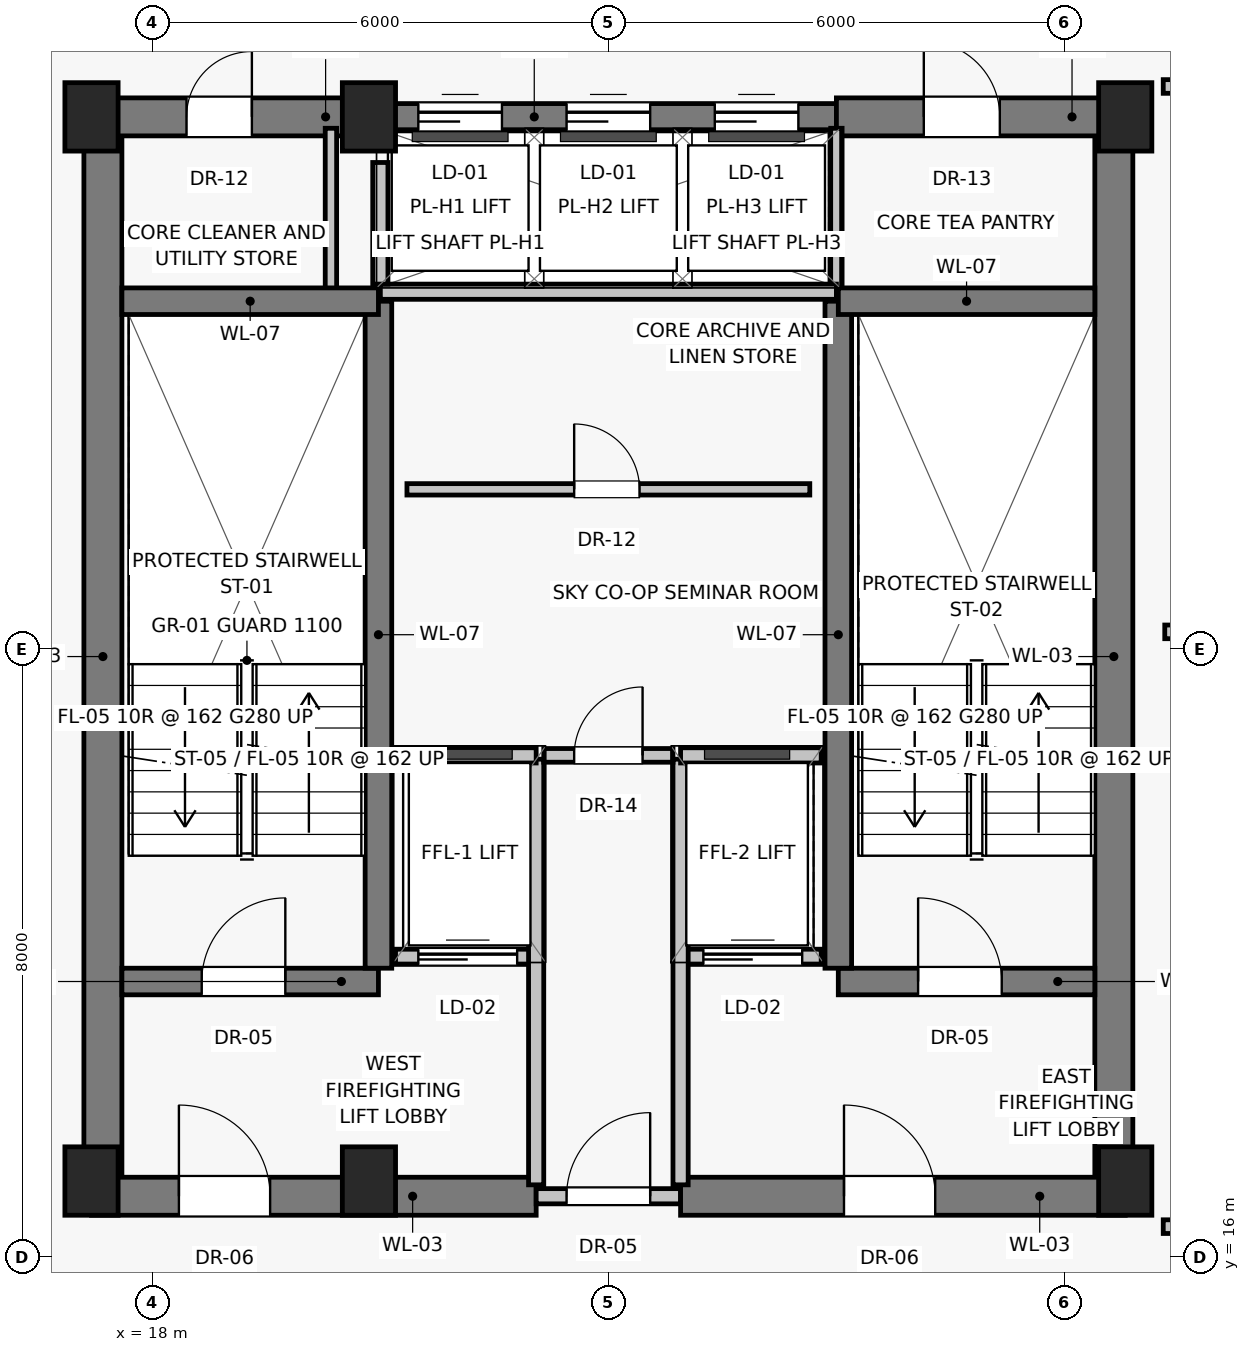
"""IFC4 building model, lengths in metres.
Left out: names, types, materials, properties, quantities, classifications, styles, units other than length and angle.
Written with IfcOpenShell. Run it as: python <this file> out.ifc"""

import sys

from ifc_helpers import new_model, si_unit, direction, frame, frame_2d, origin, origin_2d, place, context, subcontext, project, spatial, rectangle, extrude, source, transform, mapped, element, fill, save


model = new_model("IFC4")
c1 = context("Model", 3, precision=1e-05, world=origin(), true_north=direction((0.0, 1.0)))
c2 = subcontext(c1, "Body", "Model", "MODEL_VIEW")
j1 = project(units=[si_unit("LENGTHUNIT", "METRE"), si_unit("PLANEANGLEUNIT", "RADIAN")], contexts=[c1])
p1 = place(None, origin())
s1 = spatial("IfcSite", under=j1, at=p1, CompositionType="ELEMENT")
p2 = place(p1, origin())
s2 = spatial("IfcBuilding", under=s1, at=p2, CompositionType="ELEMENT")
p3 = place(p2, frame((0.0, 0.0, 204.85)))
s3 = spatial("IfcBuildingStorey", under=s2, at=p3, CompositionType="ELEMENT", Elevation=204.85)
for number, where, z_axis, x_axis in (
    (1, (17.2, 17.0, 0.0), (0.0, 0.0, 1.0), (1.0, 0.0, 0.0)),
    (2, (20.85, 17.0, 0.0), (0.0, 0.0, 1.0), (1.0, 0.0, 0.0)),
    (3, (30.8, 17.0, 0.0), (0.0, 0.0, 1.0), (1.0, 0.0, 0.0)),
    (4, (17.2, 31.0, 0.0), (0.0, 0.0, 1.0), (1.0, 0.0, 0.0)),
    (5, (20.85, 31.0, 0.0), (0.0, 0.0, 1.0), (1.0, 0.0, 0.0)),
    (6, (30.8, 31.0, 0.0), (0.0, 0.0, 1.0), (1.0, 0.0, 0.0)),
):
    element("IfcColumn", number, at=place(p3, frame(where, z_axis=z_axis, x_axis=x_axis)), inside=s3, PredefinedType="PILASTER", context=c2, shape_type="SweptSolid", body=[
        extrude(rectangle(XDim=0.7, YDim=0.9, at=origin_2d()), origin(), (0.0, 0.0, 1.0), 3.25),
    ])
for number, where, z_axis, x_axis in (
    (7, (17.35, 16.8, 0.0), (0.0, 0.0, 1.0), (0.0, 1.0, 0.0)),
    (8, (30.65, 16.8, 0.0), (0.0, 0.0, 1.0), (0.0, 1.0, 0.0)),
):
    element("IfcWall", number, at=place(p3, frame(where, z_axis=z_axis, x_axis=x_axis)), inside=s3, PredefinedType="SHEAR", context=c2, shape_type="SweptSolid", body=[
        extrude(rectangle(XDim=14.2, YDim=0.5, at=frame_2d((7.1, 0.0))), origin(), (0.0, 0.0, 1.0), 3.015),
    ])
p4 = place(p3, frame((17.2, 16.8, 0.0), z_axis=(0.0, 0.0, 1.0), x_axis=(1.0, 0.0, 0.0)))
e9 = element("IfcWall", 9, at=p4, inside=s3, PredefinedType="SHEAR", context=c2, shape_type="SweptSolid", body=[
    extrude(rectangle(XDim=5.85, YDim=0.5, at=frame_2d((2.925, 0.0))), origin(), (0.0, 0.0, 1.0), 3.015),
])
p5 = place(p4, frame((1.15, 0.0, 0.0)))
e10 = element("IfcOpeningElement", 10, at=p5, cuts=e9, PredefinedType="OPENING", context=c2, shape_type="SweptSolid", body=[
    extrude(rectangle(XDim=1.2, YDim=2.03, at=frame_2d((0.6, 1.015))), frame((0.0, 0.26, 0.0), z_axis=(0.0, -1.0, 0.0), x_axis=(1.0, 0.0, 0.0)), (0.0, 0.0, 1.0), 0.52),
])
p6 = place(p3, frame((23.05, 16.8, 0.0), z_axis=(0.0, 0.0, 1.0), x_axis=(1.0, 0.0, 0.0)))
e11 = element("IfcWall", 11, at=p6, inside=s3, PredefinedType="SOLIDWALL", context=c2, shape_type="SweptSolid", body=[
    extrude(rectangle(XDim=1.9, YDim=0.2, at=frame_2d((0.95, 0.0))), origin(), (0.0, 0.0, 1.0), 2.165),
])
p7 = place(p6, frame((0.4, 0.0, 0.0)))
e12 = element("IfcOpeningElement", 12, at=p7, cuts=e11, PredefinedType="OPENING", context=c2, shape_type="SweptSolid", body=[
    extrude(rectangle(XDim=1.1, YDim=2.03, at=frame_2d((0.55, 1.015))), frame((0.0, 0.11, 0.0), z_axis=(0.0, -1.0, 0.0), x_axis=(1.0, 0.0, 0.0)), (0.0, 0.0, 1.0), 0.22),
])
p8 = place(p3, frame((24.95, 16.8, 0.0), z_axis=(0.0, 0.0, 1.0), x_axis=(1.0, 0.0, 0.0)))
e13 = element("IfcWall", 13, at=p8, inside=s3, PredefinedType="SHEAR", context=c2, shape_type="SweptSolid", body=[
    extrude(rectangle(XDim=5.85, YDim=0.5, at=frame_2d((2.925, 0.0))), origin(), (0.0, 0.0, 1.0), 3.015),
])
p9 = place(p8, frame((2.15, 0.0, 0.0)))
e14 = element("IfcOpeningElement", 14, at=p9, cuts=e13, PredefinedType="OPENING", context=c2, shape_type="SweptSolid", body=[
    extrude(rectangle(XDim=1.2, YDim=2.03, at=frame_2d((0.6, 1.015))), frame((0.0, 0.26, 0.0), z_axis=(0.0, -1.0, 0.0), x_axis=(1.0, 0.0, 0.0)), (0.0, 0.0, 1.0), 0.52),
])
p10 = place(p3, frame((17.2, 31.0, 0.0), z_axis=(0.0, 0.0, 1.0), x_axis=(1.0, 0.0, 0.0)))
e15 = element("IfcWall", 15, at=p10, inside=s3, PredefinedType="SHEAR", context=c2, shape_type="SweptSolid", body=[
    extrude(rectangle(XDim=3.8, YDim=0.5, at=frame_2d((1.9, 0.0))), origin(), (0.0, 0.0, 1.0), 3.015),
])
p11 = place(p10, frame((1.25, 0.0, 0.0)))
e16 = element("IfcOpeningElement", 16, at=p11, cuts=e15, PredefinedType="OPENING", context=c2, shape_type="SweptSolid", body=[
    extrude(rectangle(XDim=0.86, YDim=2.01, at=frame_2d((0.43, 1.005))), frame((0.0, 0.26, 0.0), z_axis=(0.0, -1.0, 0.0), x_axis=(1.0, 0.0, 0.0)), (0.0, 0.0, 1.0), 0.52),
])
p12 = place(p3, frame((21.0, 31.0, 0.0), z_axis=(0.0, 0.0, 1.0), x_axis=(1.0, 0.0, 0.0)))
e17 = element("IfcWall", 17, at=p12, inside=s3, PredefinedType="SHEAR", context=c2, shape_type="SweptSolid", body=[
    extrude(rectangle(XDim=6.0, YDim=0.35, at=frame_2d((3.0, 0.0))), origin(), (0.0, 0.0, 1.0), 3.015),
])
p13 = place(p12, frame((0.5, 0.0, 0.0)))
e18 = element("IfcOpeningElement", 18, at=p13, cuts=e17, PredefinedType="OPENING", context=c2, shape_type="SweptSolid", body=[
    extrude(rectangle(XDim=1.1, YDim=2.08, at=frame_2d((0.55, 1.04))), frame((0.0, 0.185, 0.0), z_axis=(0.0, -1.0, 0.0), x_axis=(1.0, 0.0, 0.0)), (0.0, 0.0, 1.0), 0.37),
])
p14 = place(p12, frame((2.45, 0.0, 0.0)))
e19 = element("IfcOpeningElement", 19, at=p14, cuts=e17, PredefinedType="OPENING", context=c2, shape_type="SweptSolid", body=[
    extrude(rectangle(XDim=1.1, YDim=2.08, at=frame_2d((0.55, 1.04))), frame((0.0, 0.185, 0.0), z_axis=(0.0, -1.0, 0.0), x_axis=(1.0, 0.0, 0.0)), (0.0, 0.0, 1.0), 0.37),
])
p15 = place(p12, frame((4.4, 0.0, 0.0)))
e20 = element("IfcOpeningElement", 20, at=p15, cuts=e17, PredefinedType="OPENING", context=c2, shape_type="SweptSolid", body=[
    extrude(rectangle(XDim=1.1, YDim=2.08, at=frame_2d((0.55, 1.04))), frame((0.0, 0.185, 0.0), z_axis=(0.0, -1.0, 0.0), x_axis=(1.0, 0.0, 0.0)), (0.0, 0.0, 1.0), 0.37),
])
p16 = place(p3, frame((27.0, 31.0, 0.0), z_axis=(0.0, 0.0, 1.0), x_axis=(1.0, 0.0, 0.0)))
e21 = element("IfcWall", 21, at=p16, inside=s3, PredefinedType="SHEAR", context=c2, shape_type="SweptSolid", body=[
    extrude(rectangle(XDim=3.8, YDim=0.5, at=frame_2d((1.9, 0.0))), origin(), (0.0, 0.0, 1.0), 3.015),
])
p17 = place(p16, frame((1.15, 0.0, 0.0)))
e22 = element("IfcOpeningElement", 22, at=p17, cuts=e21, PredefinedType="OPENING", context=c2, shape_type="SweptSolid", body=[
    extrude(rectangle(XDim=1.0, YDim=2.01, at=frame_2d((0.5, 1.005))), frame((0.0, 0.26, 0.0), z_axis=(0.0, -1.0, 0.0), x_axis=(1.0, 0.0, 0.0)), (0.0, 0.0, 1.0), 0.52),
])
for number, where, z_axis, x_axis in (
    (23, (20.35, 28.65, 0.0), (0.0, 0.0, 1.0), (0.0, 1.0, 0.0)),
    (24, (27.0, 28.65, 0.0), (0.0, 0.0, 1.0), (0.0, 1.0, 0.0)),
):
    element("IfcWall", number, at=place(p3, frame(where, z_axis=z_axis, x_axis=x_axis)), inside=s3, PredefinedType="PARTITIONING", context=c2, shape_type="SweptSolid", body=[
        extrude(rectangle(XDim=2.2, YDim=0.15, at=frame_2d((1.1, 0.0))), origin(), (0.0, 0.0, 1.0), 3.015),
    ])
p18 = place(p3, frame((17.6, 19.625, 0.0), z_axis=(0.0, 0.0, 1.0), x_axis=(1.0, 0.0, 0.0)))
e25 = element("IfcWall", 25, at=p18, inside=s3, PredefinedType="SHEAR", context=c2, shape_type="SweptSolid", body=[
    extrude(rectangle(XDim=3.375, YDim=0.35, at=frame_2d((1.688, 0.0))), origin(), (0.0, 0.0, 1.0), 3.015),
])
p19 = place(p18, frame((1.05, 0.0, 0.0)))
e26 = element("IfcOpeningElement", 26, at=p19, cuts=e25, PredefinedType="OPENING", context=c2, shape_type="SweptSolid", body=[
    extrude(rectangle(XDim=1.1, YDim=2.03, at=frame_2d((0.55, 1.015))), frame((0.0, 0.185, 0.0), z_axis=(0.0, -1.0, 0.0), x_axis=(1.0, 0.0, 0.0)), (0.0, 0.0, 1.0), 0.37),
])
p20 = place(p3, frame((21.2, 19.95, 0.0), z_axis=(0.0, 0.0, 1.0), x_axis=(1.0, 0.0, 0.0)))
e27 = element("IfcWall", 27, at=p20, inside=s3, PredefinedType="SOLIDWALL", context=c2, shape_type="SweptSolid", body=[
    extrude(rectangle(XDim=1.85, YDim=0.2, at=frame_2d((0.925, 0.0))), origin(), (0.0, 0.0, 1.0), 3.015),
])
p21 = place(p20, frame((0.3, 0.0, 0.0)))
e28 = element("IfcOpeningElement", 28, at=p21, cuts=e27, PredefinedType="OPENING", context=c2, shape_type="SweptSolid", body=[
    extrude(rectangle(XDim=1.3, YDim=2.25, at=frame_2d((0.65, 1.125))), frame((0.0, 0.11, 0.0), z_axis=(0.0, -1.0, 0.0), x_axis=(1.0, 0.0, 0.0)), (0.0, 0.0, 1.0), 0.22),
])
p22 = place(p3, frame((24.95, 19.95, 0.0), z_axis=(0.0, 0.0, 1.0), x_axis=(1.0, 0.0, 0.0)))
e29 = element("IfcWall", 29, at=p22, inside=s3, PredefinedType="SOLIDWALL", context=c2, shape_type="SweptSolid", body=[
    extrude(rectangle(XDim=1.85, YDim=0.2, at=frame_2d((0.925, 0.0))), origin(), (0.0, 0.0, 1.0), 3.015),
])
p23 = place(p22, frame((0.3, 0.0, 0.0)))
e30 = element("IfcOpeningElement", 30, at=p23, cuts=e29, PredefinedType="OPENING", context=c2, shape_type="SweptSolid", body=[
    extrude(rectangle(XDim=1.3, YDim=2.25, at=frame_2d((0.65, 1.125))), frame((0.0, 0.11, 0.0), z_axis=(0.0, -1.0, 0.0), x_axis=(1.0, 0.0, 0.0)), (0.0, 0.0, 1.0), 0.22),
])
p24 = place(p3, frame((27.025, 19.625, 0.0), z_axis=(0.0, 0.0, 1.0), x_axis=(1.0, 0.0, 0.0)))
e31 = element("IfcWall", 31, at=p24, inside=s3, PredefinedType="SHEAR", context=c2, shape_type="SweptSolid", body=[
    extrude(rectangle(XDim=3.375, YDim=0.35, at=frame_2d((1.688, 0.0))), origin(), (0.0, 0.0, 1.0), 3.015),
])
p25 = place(p24, frame((1.05, 0.0, 0.0)))
e32 = element("IfcOpeningElement", 32, at=p25, cuts=e31, PredefinedType="OPENING", context=c2, shape_type="SweptSolid", body=[
    extrude(rectangle(XDim=1.1, YDim=2.03, at=frame_2d((0.55, 1.015))), frame((0.0, 0.185, 0.0), z_axis=(0.0, -1.0, 0.0), x_axis=(1.0, 0.0, 0.0)), (0.0, 0.0, 1.0), 0.37),
])
for number, where, z_axis, x_axis in (
    (33, (20.975, 19.8, 0.0), (0.0, 0.0, 1.0), (0.0, 1.0, 0.0)),
    (34, (27.025, 19.8, 0.0), (0.0, 0.0, 1.0), (0.0, 1.0, 0.0)),
):
    element("IfcWall", number, at=place(p3, frame(where, z_axis=z_axis, x_axis=x_axis)), inside=s3, PredefinedType="SHEAR", context=c2, shape_type="SweptSolid", body=[
        extrude(rectangle(XDim=8.775, YDim=0.35, at=frame_2d((4.387, 0.0))), origin(), (0.0, 0.0, 1.0), 3.015),
    ])
for number, where, z_axis, x_axis in (
    (35, (17.6, 28.575, 0.0), (0.0, 0.0, 1.0), (1.0, 0.0, 0.0)),
    (36, (27.025, 28.575, 0.0), (0.0, 0.0, 1.0), (1.0, 0.0, 0.0)),
):
    element("IfcWall", number, at=place(p3, frame(where, z_axis=z_axis, x_axis=x_axis)), inside=s3, PredefinedType="SHEAR", context=c2, shape_type="SweptSolid", body=[
        extrude(rectangle(XDim=3.375, YDim=0.35, at=frame_2d((1.688, 0.0))), origin(), (0.0, 0.0, 1.0), 3.015),
    ])
for number, where, z_axis, x_axis in (
    (37, (23.05, 16.95, 0.0), (0.0, 0.0, 1.0), (0.0, 1.0, 0.0)),
    (38, (24.95, 16.95, 0.0), (0.0, 0.0, 1.0), (0.0, 1.0, 0.0)),
):
    element("IfcWall", number, at=place(p3, frame(where, z_axis=z_axis, x_axis=x_axis)), inside=s3, PredefinedType="SOLIDWALL", context=c2, shape_type="SweptSolid", body=[
        extrude(rectangle(XDim=5.6, YDim=0.2, at=frame_2d((2.8, 0.0))), origin(), (0.0, 0.0, 1.0), 3.015),
    ])
for number, where, z_axis, x_axis in (
    (39, (21.2, 22.6, 0.0), (0.0, 0.0, 1.0), (1.0, 0.0, 0.0)),
    (40, (24.95, 22.6, 0.0), (0.0, 0.0, 1.0), (1.0, 0.0, 0.0)),
):
    element("IfcWall", number, at=place(p3, frame(where, z_axis=z_axis, x_axis=x_axis)), inside=s3, PredefinedType="SOLIDWALL", context=c2, shape_type="SweptSolid", body=[
        extrude(rectangle(XDim=1.85, YDim=0.2, at=frame_2d((0.925, 0.0))), origin(), (0.0, 0.0, 1.0), 3.015),
    ])
p26 = place(p3, frame((21.0, 28.7, 0.0), z_axis=(0.0, 0.0, 1.0), x_axis=(1.0, 0.0, 0.0)))
e41 = element("IfcWall", 41, at=p26, inside=s3, PredefinedType="SOLIDWALL", context=c2, shape_type="SweptSolid", body=[
    extrude(rectangle(XDim=6.0, YDim=0.2, at=frame_2d((3.0, 0.0))), origin(), (0.0, 0.0, 1.0), 3.015),
])
p27 = place(p3, frame((21.0, 28.8, 0.0), z_axis=(0.0, 0.0, 1.0), x_axis=(0.0, 1.0, 0.0)))
e42 = element("IfcWall", 42, at=p27, inside=s3, PredefinedType="SOLIDWALL", context=c2, shape_type="SweptSolid", body=[
    extrude(rectangle(XDim=1.6, YDim=0.2, at=frame_2d((0.8, 0.0))), origin(), (0.0, 0.0, 1.0), 3.015),
])
p28 = place(p3, frame((23.15, 22.6, 0.0), z_axis=(0.0, 0.0, 1.0), x_axis=(1.0, 0.0, 0.0)))
e43 = element("IfcWall", 43, at=p28, inside=s3, PredefinedType="PARTITIONING", context=c2, shape_type="SweptSolid", body=[
    extrude(rectangle(XDim=1.7, YDim=0.18, at=frame_2d((0.85, 0.0))), origin(), (0.0, 0.0, 1.0), 3.015),
])
p29 = place(p28, frame((0.4, 0.0, 0.0)))
e44 = element("IfcOpeningElement", 44, at=p29, cuts=e43, PredefinedType="OPENING", context=c2, shape_type="SweptSolid", body=[
    extrude(rectangle(XDim=0.9, YDim=2.01, at=frame_2d((0.45, 1.005))), frame((0.0, 0.1, 0.0), z_axis=(0.0, -1.0, 0.0), x_axis=(1.0, 0.0, 0.0)), (0.0, 0.0, 1.0), 0.2),
])
p30 = place(p3, frame((21.35, 26.1, 0.0), z_axis=(0.0, 0.0, 1.0), x_axis=(1.0, 0.0, 0.0)))
e45 = element("IfcWall", 45, at=p30, inside=s3, PredefinedType="PARTITIONING", context=c2, shape_type="SweptSolid", body=[
    extrude(rectangle(XDim=5.3, YDim=0.15, at=frame_2d((2.65, 0.0))), origin(), (0.0, 0.0, 1.0), 3.015),
])
p31 = place(p30, frame((2.2, 0.0, 0.0)))
e46 = element("IfcOpeningElement", 46, at=p31, cuts=e45, PredefinedType="OPENING", context=c2, shape_type="SweptSolid", body=[
    extrude(rectangle(XDim=0.86, YDim=2.01, at=frame_2d((0.43, 1.005))), frame((0.0, 0.085, 0.0), z_axis=(0.0, -1.0, 0.0), x_axis=(1.0, 0.0, 0.0)), (0.0, 0.0, 1.0), 0.17),
])
p32 = place(p3, frame((31.32, 24.225, 0.0), z_axis=(0.0, 0.0, 1.0), x_axis=(1.0, 0.0, 0.0)))
e47 = element("IfcWall", 47, at=p32, inside=s3, PredefinedType="PARTITIONING", context=c2, shape_type="SweptSolid", body=[
    extrude(rectangle(XDim=10.419, YDim=0.18, at=frame_2d((5.209, 0.0))), origin(), (0.0, 0.0, 1.0), 3.015),
])
p33 = place(p3, frame((31.3, 16.4, 0.0), z_axis=(0.0, 0.0, 1.0), x_axis=(1.0, 0.0, 0.0)))
e48 = element("IfcWall", 48, at=p33, inside=s3, PredefinedType="PARTITIONING", context=c2, shape_type="SweptSolid", body=[
    extrude(rectangle(XDim=1.92, YDim=0.18, at=frame_2d((0.96, 0.0))), origin(), (0.0, 0.0, 1.0), 3.015),
])
p34 = place(p33, frame((0.72, 0.0, 0.0)))
e49 = element("IfcOpeningElement", 49, at=p34, cuts=e48, PredefinedType="OPENING", context=c2, shape_type="SweptSolid", body=[
    extrude(rectangle(XDim=1.0, YDim=2.01, at=frame_2d((0.5, 1.005))), frame((0.0, 0.1, 0.0), z_axis=(0.0, -1.0, 0.0), x_axis=(1.0, 0.0, 0.0)), (0.0, 0.0, 1.0), 0.2),
])
p35 = place(p3, frame((31.3, 31.4, 0.0), z_axis=(0.0, 0.0, 1.0), x_axis=(1.0, 0.0, 0.0)))
e50 = element("IfcWall", 50, at=p35, inside=s3, PredefinedType="PARTITIONING", context=c2, shape_type="SweptSolid", body=[
    extrude(rectangle(XDim=1.92, YDim=0.18, at=frame_2d((0.96, 0.0))), origin(), (0.0, 0.0, 1.0), 3.015),
])
p36 = place(p35, frame((0.72, 0.0, 0.0)))
e51 = element("IfcOpeningElement", 51, at=p36, cuts=e50, PredefinedType="OPENING", context=c2, shape_type="SweptSolid", body=[
    extrude(rectangle(XDim=1.0, YDim=2.01, at=frame_2d((0.5, 1.005))), frame((0.0, 0.1, 0.0), z_axis=(0.0, -1.0, 0.0), x_axis=(1.0, 0.0, 0.0)), (0.0, 0.0, 1.0), 0.2),
])
m1 = source(origin(), c2, "Body", "SweptSolid", [
    extrude(rectangle(XDim=1.2, YDim=2.03, at=frame_2d((0.6, 1.015))), frame((0.0, 0.025, 0.0), z_axis=(0.0, -1.0, 0.0), x_axis=(1.0, 0.0, 0.0)), (0.0, 0.0, 1.0), 0.05),
])
p37 = place(p5, origin())
e52 = element("IfcDoor", 52, at=p37, inside=s3, OperationType="SINGLE_SWING_LEFT", PredefinedType="DOOR", context=c2, shape_type="MappedRepresentation", body=[
    mapped(m1, transform((0.0, 0.0, 0.0), scale=1.0)),
])
fill(e10, e52)
m2 = source(origin(), c2, "Body", "SweptSolid", [
    extrude(rectangle(XDim=1.1, YDim=2.03, at=frame_2d((0.55, 1.015))), frame((0.0, 0.025, 0.0), z_axis=(0.0, -1.0, 0.0), x_axis=(1.0, 0.0, 0.0)), (0.0, 0.0, 1.0), 0.05),
])
p38 = place(p7, origin())
e53 = element("IfcDoor", 53, at=p38, inside=s3, OperationType="SINGLE_SWING_RIGHT", PredefinedType="DOOR", context=c2, shape_type="MappedRepresentation", body=[
    mapped(m2, transform((0.0, 0.0, 0.0), scale=1.0)),
])
fill(e12, e53)
p39 = place(p9, origin())
e54 = element("IfcDoor", 54, at=p39, inside=s3, OperationType="SINGLE_SWING_LEFT", PredefinedType="DOOR", context=c2, shape_type="MappedRepresentation", body=[
    mapped(m1, transform((0.0, 0.0, 0.0), scale=1.0)),
])
fill(e14, e54)
m3 = source(origin(), c2, "Body", "SweptSolid", [
    extrude(rectangle(XDim=0.86, YDim=2.01, at=frame_2d((0.43, 1.005))), frame((0.0, 0.025, 0.0), z_axis=(0.0, -1.0, 0.0), x_axis=(1.0, 0.0, 0.0)), (0.0, 0.0, 1.0), 0.05),
])
p40 = place(p11, origin())
e55 = element("IfcDoor", 55, at=p40, inside=s3, OperationType="SINGLE_SWING_RIGHT", PredefinedType="DOOR", context=c2, shape_type="MappedRepresentation", body=[
    mapped(m3, transform((0.0, 0.0, 0.0), scale=1.0)),
])
fill(e16, e55)
m4 = source(origin(), c2, "Body", "SweptSolid", [
    extrude(rectangle(XDim=1.1, YDim=2.08, at=frame_2d((0.55, 1.04))), frame((0.0, 0.025, 0.0), z_axis=(0.0, -1.0, 0.0), x_axis=(1.0, 0.0, 0.0)), (0.0, 0.0, 1.0), 0.05),
])
p41 = place(p13, origin())
e56 = element("IfcDoor", 56, at=p41, inside=s3, OperationType="SLIDING_TO_LEFT", PredefinedType="DOOR", context=c2, shape_type="MappedRepresentation", body=[
    mapped(m4, transform((0.0, 0.0, 0.0), scale=1.0)),
])
fill(e18, e56)
p42 = place(p14, origin())
e57 = element("IfcDoor", 57, at=p42, inside=s3, OperationType="SLIDING_TO_LEFT", PredefinedType="DOOR", context=c2, shape_type="MappedRepresentation", body=[
    mapped(m4, transform((0.0, 0.0, 0.0), scale=1.0)),
])
fill(e19, e57)
p43 = place(p15, origin())
e58 = element("IfcDoor", 58, at=p43, inside=s3, OperationType="SLIDING_TO_LEFT", PredefinedType="DOOR", context=c2, shape_type="MappedRepresentation", body=[
    mapped(m4, transform((0.0, 0.0, 0.0), scale=1.0)),
])
fill(e20, e58)
m5 = source(origin(), c2, "Body", "SweptSolid", [
    extrude(rectangle(XDim=1.0, YDim=2.01, at=frame_2d((0.5, 1.005))), frame((0.0, 0.025, 0.0), z_axis=(0.0, -1.0, 0.0), x_axis=(1.0, 0.0, 0.0)), (0.0, 0.0, 1.0), 0.05),
])
p44 = place(p17, origin())
e59 = element("IfcDoor", 59, at=p44, inside=s3, OperationType="SINGLE_SWING_LEFT", PredefinedType="DOOR", context=c2, shape_type="MappedRepresentation", body=[
    mapped(m5, transform((0.0, 0.0, 0.0), scale=1.0)),
])
fill(e22, e59)
p45 = place(p19, origin())
e60 = element("IfcDoor", 60, at=p45, inside=s3, OperationType="SINGLE_SWING_RIGHT", PredefinedType="DOOR", context=c2, shape_type="MappedRepresentation", body=[
    mapped(m2, transform((0.0, 0.0, 0.0), scale=1.0)),
])
fill(e26, e60)
m6 = source(origin(), c2, "Body", "SweptSolid", [
    extrude(rectangle(XDim=1.3, YDim=2.25, at=frame_2d((0.65, 1.125))), frame((0.0, 0.025, 0.0), z_axis=(0.0, -1.0, 0.0), x_axis=(1.0, 0.0, 0.0)), (0.0, 0.0, 1.0), 0.05),
])
p46 = place(p21, origin())
e61 = element("IfcDoor", 61, at=p46, inside=s3, OperationType="SLIDING_TO_LEFT", PredefinedType="DOOR", context=c2, shape_type="MappedRepresentation", body=[
    mapped(m6, transform((0.0, 0.0, 0.0), scale=1.0)),
])
fill(e28, e61)
p47 = place(p23, origin())
e62 = element("IfcDoor", 62, at=p47, inside=s3, OperationType="SLIDING_TO_LEFT", PredefinedType="DOOR", context=c2, shape_type="MappedRepresentation", body=[
    mapped(m6, transform((0.0, 0.0, 0.0), scale=1.0)),
])
fill(e30, e62)
p48 = place(p25, origin())
e63 = element("IfcDoor", 63, at=p48, inside=s3, OperationType="SINGLE_SWING_LEFT", PredefinedType="DOOR", context=c2, shape_type="MappedRepresentation", body=[
    mapped(m2, transform((0.0, 0.0, 0.0), scale=1.0)),
])
fill(e32, e63)
m7 = source(origin(), c2, "Body", "SweptSolid", [
    extrude(rectangle(XDim=0.9, YDim=2.01, at=frame_2d((0.45, 1.005))), frame((0.0, 0.025, 0.0), z_axis=(0.0, -1.0, 0.0), x_axis=(1.0, 0.0, 0.0)), (0.0, 0.0, 1.0), 0.05),
])
p49 = place(p29, origin())
e64 = element("IfcDoor", 64, at=p49, inside=s3, OperationType="SINGLE_SWING_RIGHT", PredefinedType="DOOR", context=c2, shape_type="MappedRepresentation", body=[
    mapped(m7, transform((0.0, 0.0, 0.0), scale=1.0)),
])
fill(e44, e64)
p50 = place(p31, origin())
e65 = element("IfcDoor", 65, at=p50, inside=s3, OperationType="SINGLE_SWING_LEFT", PredefinedType="DOOR", context=c2, shape_type="MappedRepresentation", body=[
    mapped(m3, transform((0.0, 0.0, 0.0), scale=1.0)),
])
fill(e46, e65)
save(model, sys.argv[1])
